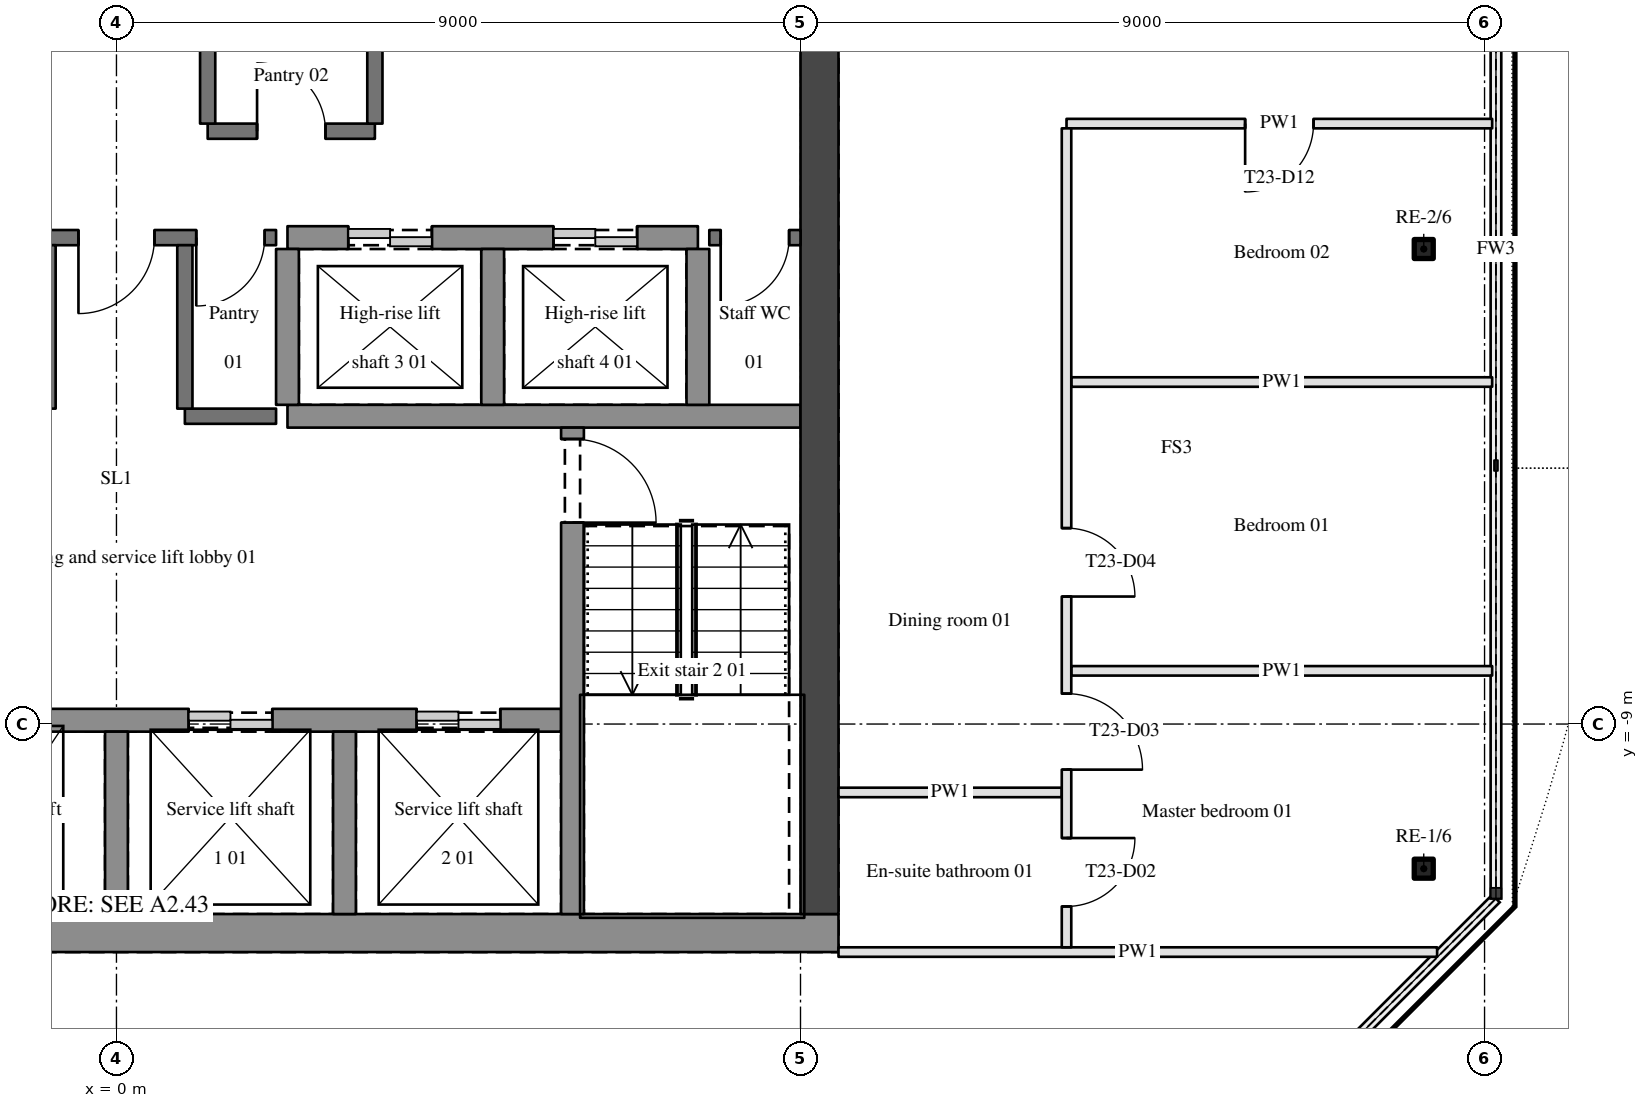
"""IFC4 building model, lengths in metres.
Left out: names, types, materials, properties, quantities, classifications, styles, units other than length and angle.
Written with IfcOpenShell. Run it as: python <this file> out.ifc"""

import sys

from ifc_helpers import new_model, si_unit, direction, frame, frame_2d, origin, origin_2d, place, context, subcontext, project, spatial, rectangle, hollow_rectangle, extrude, element, fill, save


model = new_model("IFC4")
c1 = context("Model", 3, precision=1e-05, world=origin(), true_north=direction((0.0, 1.0)))
c2 = subcontext(c1, "Body", "Model", "MODEL_VIEW")
j1 = project(units=[si_unit("LENGTHUNIT", "METRE"), si_unit("PLANEANGLEUNIT", "RADIAN")], contexts=[c1])
p1 = place(None, origin())
s1 = spatial("IfcSite", under=j1, at=p1, CompositionType="ELEMENT")
p2 = place(p1, origin())
s2 = spatial("IfcBuilding", under=s1, at=p2, CompositionType="ELEMENT")
p3 = place(p2, frame((0.0, 0.0, 294.15)))
s3 = spatial("IfcBuildingStorey", under=s2, at=p3, CompositionType="ELEMENT", Elevation=294.15)
for number, where, z_axis, x_axis in (
    (1, (17.2, -10.903, 0.0), (0.0, 0.0, 1.0), (1.0, 0.0, 0.0)),
    (2, (17.2, -2.75, 0.0), (0.0, 0.0, 1.0), (1.0, 0.0, 0.0)),
):
    element("IfcColumn", number, at=place(p3, frame(where, z_axis=z_axis, x_axis=x_axis)), inside=s3, PredefinedType="COLUMN", context=c2, shape_type="SweptSolid", body=[
        extrude(hollow_rectangle(XDim=0.25, YDim=0.25, WallThickness=0.02, InnerFilletRadius=0.03, OuterFilletRadius=0.05, at=origin_2d()), origin(), (0.0, 0.0, 1.0), 3.15),
    ])
p4 = place(p3, frame((-9.5, -11.75, 0.0), z_axis=(0.0, 0.0, 1.0), x_axis=(1.0, 0.0, 0.0)))
e3 = element("IfcWall", 3, at=p4, inside=s3, PredefinedType="SHEAR", context=c2, shape_type="SweptSolid", body=[
    extrude(rectangle(XDim=19.0, YDim=0.5, at=frame_2d((9.5, 0.0))), origin(), (0.0, 0.0, 1.0), 3.15),
])
p5 = place(p3, frame((9.25, -11.5, 0.0), z_axis=(0.0, 0.0, 1.0), x_axis=(0.0, 1.0, 0.0)))
e4 = element("IfcWall", 4, at=p5, inside=s3, PredefinedType="SHEAR", context=c2, shape_type="SweptSolid", body=[
    extrude(rectangle(XDim=11.65, YDim=0.5, at=frame_2d((5.825, 0.0))), origin(), (0.0, 0.0, 1.0), 3.15),
])
p6 = place(p3, frame((9.5, -12.0, 0.0), z_axis=(0.0, 0.0, 1.0), x_axis=(1.0, 0.0, 0.0)))
e5 = element("IfcWall", 5, at=p6, inside=s3, PredefinedType="PARTITIONING", context=c2, shape_type="SweptSolid", body=[
    extrude(rectangle(XDim=7.876, YDim=0.125, at=frame_2d((3.938, 0.0))), origin(), (0.0, 0.0, 1.0), 2.21),
])
p7 = place(p3, frame((9.5, -9.9, 0.0), z_axis=(0.0, 0.0, 1.0), x_axis=(1.0, 0.0, 0.0)))
e6 = element("IfcWall", 6, at=p7, inside=s3, PredefinedType="PARTITIONING", context=c2, shape_type="SweptSolid", body=[
    extrude(rectangle(XDim=2.938, YDim=0.125, at=frame_2d((1.469, 0.0))), origin(), (0.0, 0.0, 1.0), 2.21),
])
p8 = place(p3, frame((-5.85, -8.95, 0.0), z_axis=(0.0, 0.0, 1.0), x_axis=(1.0, 0.0, 0.0)))
e7 = element("IfcWall", 7, at=p8, inside=s3, PredefinedType="SHEAR", context=c2, shape_type="SweptSolid", body=[
    extrude(rectangle(XDim=11.7, YDim=0.3, at=frame_2d((5.85, 0.0))), origin(), (0.0, 0.0, 1.0), 3.15),
])
p9 = place(p8, frame((0.8, 0.0, 0.0)))
e8 = element("IfcOpeningElement", 8, at=p9, cuts=e7, PredefinedType="OPENING", context=c2, shape_type="SweptSolid", body=[
    extrude(rectangle(XDim=1.1, YDim=2.1, at=frame_2d((0.55, 1.05))), frame((0.0, 0.16, 0.0), z_axis=(0.0, -1.0, 0.0), x_axis=(1.0, 0.0, 0.0)), (0.0, 0.0, 1.0), 0.32),
])
p10 = place(p8, frame((3.8, 0.0, 0.0)))
e9 = element("IfcOpeningElement", 9, at=p10, cuts=e7, PredefinedType="OPENING", context=c2, shape_type="SweptSolid", body=[
    extrude(rectangle(XDim=1.1, YDim=2.1, at=frame_2d((0.55, 1.05))), frame((0.0, 0.16, 0.0), z_axis=(0.0, -1.0, 0.0), x_axis=(1.0, 0.0, 0.0)), (0.0, 0.0, 1.0), 0.32),
])
p11 = place(p8, frame((6.8, 0.0, 0.0)))
e10 = element("IfcOpeningElement", 10, at=p11, cuts=e7, PredefinedType="OPENING", context=c2, shape_type="SweptSolid", body=[
    extrude(rectangle(XDim=1.1, YDim=2.1, at=frame_2d((0.55, 1.05))), frame((0.0, 0.16, 0.0), z_axis=(0.0, -1.0, 0.0), x_axis=(1.0, 0.0, 0.0)), (0.0, 0.0, 1.0), 0.32),
])
p12 = place(p8, frame((9.8, 0.0, 0.0)))
e11 = element("IfcOpeningElement", 11, at=p12, cuts=e7, PredefinedType="OPENING", context=c2, shape_type="SweptSolid", body=[
    extrude(rectangle(XDim=1.1, YDim=2.1, at=frame_2d((0.55, 1.05))), frame((0.0, 0.16, 0.0), z_axis=(0.0, -1.0, 0.0), x_axis=(1.0, 0.0, 0.0)), (0.0, 0.0, 1.0), 0.32),
])
p13 = place(p3, frame((12.562, -8.3, 0.0), z_axis=(0.0, 0.0, 1.0), x_axis=(1.0, 0.0, 0.0)))
e12 = element("IfcWall", 12, at=p13, inside=s3, PredefinedType="PARTITIONING", context=c2, shape_type="SweptSolid", body=[
    extrude(rectangle(XDim=5.538, YDim=0.125, at=frame_2d((2.769, 0.0))), origin(), (0.0, 0.0, 1.0), 2.21),
])
p14 = place(p3, frame((0.9, -4.95, 0.0), z_axis=(0.0, 0.0, 1.0), x_axis=(1.0, 0.0, 0.0)))
e13 = element("IfcWall", 13, at=p14, inside=s3, PredefinedType="SOLIDWALL", context=c2, shape_type="SweptSolid", body=[
    extrude(rectangle(XDim=1.2, YDim=0.2, at=frame_2d((0.6, 0.0))), origin(), (0.0, 0.0, 1.0), 2.85),
])
p15 = place(p3, frame((2.25, -4.95, 0.0), z_axis=(0.0, 0.0, 1.0), x_axis=(1.0, 0.0, 0.0)))
e14 = element("IfcWall", 14, at=p15, inside=s3, PredefinedType="SHEAR", context=c2, shape_type="SweptSolid", body=[
    extrude(rectangle(XDim=6.75, YDim=0.3, at=frame_2d((3.375, 0.0))), origin(), (0.0, 0.0, 1.0), 3.15),
])
p16 = place(p3, frame((12.562, -4.5, 0.0), z_axis=(0.0, 0.0, 1.0), x_axis=(1.0, 0.0, 0.0)))
e15 = element("IfcWall", 15, at=p16, inside=s3, PredefinedType="PARTITIONING", context=c2, shape_type="SweptSolid", body=[
    extrude(rectangle(XDim=5.538, YDim=0.125, at=frame_2d((2.769, 0.0))), origin(), (0.0, 0.0, 1.0), 2.21),
])
p17 = place(p3, frame((2.1, -2.6, 0.0), z_axis=(0.0, 0.0, 1.0), x_axis=(-1.0, 0.0, 0.0)))
e16 = element("IfcWall", 16, at=p17, inside=s3, PredefinedType="SOLIDWALL", context=c2, shape_type="SweptSolid", body=[
    extrude(rectangle(XDim=4.2, YDim=0.2, at=frame_2d((2.1, 0.0))), origin(), (0.0, 0.0, 1.0), 2.85),
])
p18 = place(p17, frame((1.6, 0.0, 0.0)))
e17 = element("IfcOpeningElement", 17, at=p18, cuts=e16, PredefinedType="OPENING", context=c2, shape_type="SweptSolid", body=[
    extrude(rectangle(XDim=1.0, YDim=2.1, at=frame_2d((0.5, 1.05))), frame((0.0, 0.11, 0.0), z_axis=(0.0, -1.0, 0.0), x_axis=(1.0, 0.0, 0.0)), (0.0, 0.0, 1.0), 0.22),
])
p19 = place(p17, frame((3.15, 0.0, 0.0)))
e18 = element("IfcOpeningElement", 18, at=p19, cuts=e16, PredefinedType="OPENING", context=c2, shape_type="SweptSolid", body=[
    extrude(rectangle(XDim=0.9, YDim=2.1, at=frame_2d((0.45, 1.05))), frame((0.0, 0.11, 0.0), z_axis=(0.0, -1.0, 0.0), x_axis=(1.0, 0.0, 0.0)), (0.0, 0.0, 1.0), 0.22),
])
p20 = place(p17, frame((0.15, 0.0, 0.0)))
e19 = element("IfcOpeningElement", 19, at=p20, cuts=e16, PredefinedType="OPENING", context=c2, shape_type="SweptSolid", body=[
    extrude(rectangle(XDim=0.9, YDim=2.1, at=frame_2d((0.45, 1.05))), frame((0.0, 0.11, 0.0), z_axis=(0.0, -1.0, 0.0), x_axis=(1.0, 0.0, 0.0)), (0.0, 0.0, 1.0), 0.22),
])
p21 = place(p3, frame((2.25, -2.6, 0.0), z_axis=(0.0, 0.0, 1.0), x_axis=(1.0, 0.0, 0.0)))
e20 = element("IfcWall", 20, at=p21, inside=s3, PredefinedType="SHEAR", context=c2, shape_type="SweptSolid", body=[
    extrude(rectangle(XDim=5.4, YDim=0.3, at=frame_2d((2.7, 0.0))), origin(), (0.0, 0.0, 1.0), 3.15),
])
p22 = place(p21, frame((0.8, 0.0, 0.0)))
e21 = element("IfcOpeningElement", 21, at=p22, cuts=e20, PredefinedType="OPENING", context=c2, shape_type="SweptSolid", body=[
    extrude(rectangle(XDim=1.1, YDim=2.1, at=frame_2d((0.55, 1.05))), frame((0.0, 0.16, 0.0), z_axis=(0.0, -1.0, 0.0), x_axis=(1.0, 0.0, 0.0)), (0.0, 0.0, 1.0), 0.32),
])
p23 = place(p21, frame((3.5, 0.0, 0.0)))
e22 = element("IfcOpeningElement", 22, at=p23, cuts=e20, PredefinedType="OPENING", context=c2, shape_type="SweptSolid", body=[
    extrude(rectangle(XDim=1.1, YDim=2.1, at=frame_2d((0.55, 1.05))), frame((0.0, 0.16, 0.0), z_axis=(0.0, -1.0, 0.0), x_axis=(1.0, 0.0, 0.0)), (0.0, 0.0, 1.0), 0.32),
])
p24 = place(p3, frame((9.0, -2.6, 0.0), z_axis=(0.0, 0.0, 1.0), x_axis=(-1.0, 0.0, 0.0)))
e23 = element("IfcWall", 23, at=p24, inside=s3, PredefinedType="SOLIDWALL", context=c2, shape_type="SweptSolid", body=[
    extrude(rectangle(XDim=1.2, YDim=0.2, at=frame_2d((0.6, 0.0))), origin(), (0.0, 0.0, 1.0), 2.85),
])
p25 = place(p24, frame((0.15, 0.0, 0.0)))
e24 = element("IfcOpeningElement", 24, at=p25, cuts=e23, PredefinedType="OPENING", context=c2, shape_type="SweptSolid", body=[
    extrude(rectangle(XDim=0.9, YDim=2.1, at=frame_2d((0.45, 1.05))), frame((0.0, 0.11, 0.0), z_axis=(0.0, -1.0, 0.0), x_axis=(1.0, 0.0, 0.0)), (0.0, 0.0, 1.0), 0.22),
])
p26 = place(p3, frame((1.2, -1.2, 0.0), z_axis=(0.0, 0.0, 1.0), x_axis=(1.0, 0.0, 0.0)))
e25 = element("IfcWall", 25, at=p26, inside=s3, PredefinedType="SOLIDWALL", context=c2, shape_type="SweptSolid", body=[
    extrude(rectangle(XDim=2.2, YDim=0.2, at=frame_2d((1.1, 0.0))), origin(), (0.0, 0.0, 1.0), 2.85),
])
p27 = place(p26, frame((0.65, 0.0, 0.0)))
e26 = element("IfcOpeningElement", 26, at=p27, cuts=e25, PredefinedType="OPENING", context=c2, shape_type="SweptSolid", body=[
    extrude(rectangle(XDim=0.9, YDim=2.1, at=frame_2d((0.45, 1.05))), frame((0.0, 0.11, 0.0), z_axis=(0.0, -1.0, 0.0), x_axis=(1.0, 0.0, 0.0)), (0.0, 0.0, 1.0), 0.22),
])
p28 = place(p3, frame((18.1, -1.1, 0.0), z_axis=(0.0, 0.0, 1.0), x_axis=(-1.0, 0.0, 0.0)))
e27 = element("IfcWall", 27, at=p28, inside=s3, PredefinedType="PARTITIONING", context=c2, shape_type="SweptSolid", body=[
    extrude(rectangle(XDim=5.6, YDim=0.125, at=frame_2d((2.8, 0.0))), origin(), (0.0, 0.0, 1.0), 2.21),
])
p29 = place(p28, frame((2.35, 0.0, 0.0)))
e28 = element("IfcOpeningElement", 28, at=p29, cuts=e27, PredefinedType="OPENING", context=c2, shape_type="SweptSolid", body=[
    extrude(rectangle(XDim=0.9, YDim=2.1, at=frame_2d((0.45, 1.05))), frame((0.0, 0.073, 0.0), z_axis=(0.0, -1.0, 0.0), x_axis=(1.0, 0.0, 0.0)), (0.0, 0.0, 1.0), 0.145),
])
p30 = place(p3, frame((-0.9, -4.85, 0.0), z_axis=(0.0, 0.0, 1.0), x_axis=(0.0, 1.0, 0.0)))
e29 = element("IfcWall", 29, at=p30, inside=s3, PredefinedType="SOLIDWALL", context=c2, shape_type="SweptSolid", body=[
    extrude(rectangle(XDim=2.15, YDim=0.2, at=frame_2d((1.075, 0.0))), origin(), (0.0, 0.0, 1.0), 2.85),
])
p31 = place(p3, frame((0.0, -11.5, 0.0), z_axis=(0.0, 0.0, 1.0), x_axis=(0.0, 1.0, 0.0)))
e30 = element("IfcWall", 30, at=p31, inside=s3, PredefinedType="SHEAR", context=c2, shape_type="SweptSolid", body=[
    extrude(rectangle(XDim=2.4, YDim=0.3, at=frame_2d((1.2, 0.0))), origin(), (0.0, 0.0, 1.0), 3.15),
])
p32 = place(p3, frame((0.9, -4.85, 0.0), z_axis=(0.0, 0.0, 1.0), x_axis=(0.0, 1.0, 0.0)))
e31 = element("IfcWall", 31, at=p32, inside=s3, PredefinedType="SOLIDWALL", context=c2, shape_type="SweptSolid", body=[
    extrude(rectangle(XDim=2.15, YDim=0.2, at=frame_2d((1.075, 0.0))), origin(), (0.0, 0.0, 1.0), 2.85),
])
p33 = place(p3, frame((1.2, -1.1, 0.0), z_axis=(0.0, 0.0, 1.0), x_axis=(0.0, 1.0, 0.0)))
e32 = element("IfcWall", 32, at=p33, inside=s3, PredefinedType="SOLIDWALL", context=c2, shape_type="SweptSolid", body=[
    extrude(rectangle(XDim=1.25, YDim=0.2, at=frame_2d((0.625, 0.0))), origin(), (0.0, 0.0, 1.0), 2.85),
])
p34 = place(p3, frame((2.25, -4.8, 0.0), z_axis=(0.0, 0.0, 1.0), x_axis=(0.0, 1.0, 0.0)))
e33 = element("IfcWall", 33, at=p34, inside=s3, PredefinedType="SHEAR", context=c2, shape_type="SweptSolid", body=[
    extrude(rectangle(XDim=2.05, YDim=0.3, at=frame_2d((1.025, 0.0))), origin(), (0.0, 0.0, 1.0), 3.15),
])
p35 = place(p3, frame((3.0, -11.5, 0.0), z_axis=(0.0, 0.0, 1.0), x_axis=(0.0, 1.0, 0.0)))
e34 = element("IfcWall", 34, at=p35, inside=s3, PredefinedType="SHEAR", context=c2, shape_type="SweptSolid", body=[
    extrude(rectangle(XDim=2.4, YDim=0.3, at=frame_2d((1.2, 0.0))), origin(), (0.0, 0.0, 1.0), 3.15),
])
p36 = place(p3, frame((3.4, -1.1, 0.0), z_axis=(0.0, 0.0, 1.0), x_axis=(0.0, 1.0, 0.0)))
e35 = element("IfcWall", 35, at=p36, inside=s3, PredefinedType="SOLIDWALL", context=c2, shape_type="SweptSolid", body=[
    extrude(rectangle(XDim=1.25, YDim=0.2, at=frame_2d((0.625, 0.0))), origin(), (0.0, 0.0, 1.0), 2.85),
])
p37 = place(p3, frame((4.95, -4.8, 0.0), z_axis=(0.0, 0.0, 1.0), x_axis=(0.0, 1.0, 0.0)))
e36 = element("IfcWall", 36, at=p37, inside=s3, PredefinedType="SHEAR", context=c2, shape_type="SweptSolid", body=[
    extrude(rectangle(XDim=2.05, YDim=0.3, at=frame_2d((1.025, 0.0))), origin(), (0.0, 0.0, 1.0), 3.15),
])
p38 = place(p3, frame((6.0, -5.1, 0.0), z_axis=(0.0, 0.0, 1.0), x_axis=(0.0, -1.0, 0.0)))
e37 = element("IfcWall", 37, at=p38, inside=s3, PredefinedType="SHEAR", context=c2, shape_type="SweptSolid", body=[
    extrude(rectangle(XDim=6.4, YDim=0.3, at=frame_2d((3.2, 0.0))), origin(), (0.0, 0.0, 1.0), 3.15),
])
p39 = place(p38, frame((0.15, 0.0, 0.0)))
e38 = element("IfcOpeningElement", 38, at=p39, cuts=e37, PredefinedType="OPENING", context=c2, shape_type="SweptSolid", body=[
    extrude(rectangle(XDim=1.1, YDim=2.1, at=frame_2d((0.55, 1.05))), frame((0.0, 0.16, 0.0), z_axis=(0.0, -1.0, 0.0), x_axis=(1.0, 0.0, 0.0)), (0.0, 0.0, 1.0), 0.32),
])
p40 = place(p3, frame((7.65, -4.8, 0.0), z_axis=(0.0, 0.0, 1.0), x_axis=(0.0, 1.0, 0.0)))
e39 = element("IfcWall", 39, at=p40, inside=s3, PredefinedType="SHEAR", context=c2, shape_type="SweptSolid", body=[
    extrude(rectangle(XDim=2.05, YDim=0.3, at=frame_2d((1.025, 0.0))), origin(), (0.0, 0.0, 1.0), 3.15),
])
p41 = place(p3, frame((12.5, -1.163, 0.0), z_axis=(0.0, 0.0, 1.0), x_axis=(0.0, -1.0, 0.0)))
e40 = element("IfcWall", 40, at=p41, inside=s3, PredefinedType="PARTITIONING", context=c2, shape_type="SweptSolid", body=[
    extrude(rectangle(XDim=10.775, YDim=0.125, at=frame_2d((5.387, 0.0))), origin(), (0.0, 0.0, 1.0), 2.21),
])
p42 = place(p41, frame((5.26, 0.0, 0.0)))
e41 = element("IfcOpeningElement", 41, at=p42, cuts=e40, PredefinedType="OPENING", context=c2, shape_type="SweptSolid", body=[
    extrude(rectangle(XDim=0.9, YDim=2.1, at=frame_2d((0.45, 1.05))), frame((0.0, 0.073, 0.0), z_axis=(0.0, -1.0, 0.0), x_axis=(1.0, 0.0, 0.0)), (0.0, 0.0, 1.0), 0.145),
])
p43 = place(p41, frame((7.438, 0.0, 0.0)))
e42 = element("IfcOpeningElement", 42, at=p43, cuts=e40, PredefinedType="OPENING", context=c2, shape_type="SweptSolid", body=[
    extrude(rectangle(XDim=1.0, YDim=2.1, at=frame_2d((0.5, 1.05))), frame((0.0, 0.073, 0.0), z_axis=(0.0, -1.0, 0.0), x_axis=(1.0, 0.0, 0.0)), (0.0, 0.0, 1.0), 0.145),
])
p44 = place(p41, frame((9.337, 0.0, 0.0)))
e43 = element("IfcOpeningElement", 43, at=p44, cuts=e40, PredefinedType="OPENING", context=c2, shape_type="SweptSolid", body=[
    extrude(rectangle(XDim=0.9, YDim=2.1, at=frame_2d((0.45, 1.05))), frame((0.0, 0.073, 0.0), z_axis=(0.0, -1.0, 0.0), x_axis=(1.0, 0.0, 0.0)), (0.0, 0.0, 1.0), 0.145),
])
p45 = place(p18, origin())
e44 = element("IfcDoor", 44, at=p45, inside=s3, OperationType="SINGLE_SWING_RIGHT", PredefinedType="DOOR", context=c2, shape_type="SweptSolid", body=[
    extrude(rectangle(XDim=1.0, YDim=2.1, at=frame_2d((0.5, 1.05))), frame((0.0, 0.025, 0.0), z_axis=(0.0, -1.0, 0.0), x_axis=(1.0, 0.0, 0.0)), (0.0, 0.0, 1.0), 0.05),
])
fill(e17, e44)
p46 = place(p39, origin())
e45 = element("IfcDoor", 45, at=p46, inside=s3, OperationType="SINGLE_SWING_RIGHT", PredefinedType="DOOR", context=c2, shape_type="SweptSolid", body=[
    extrude(rectangle(XDim=1.1, YDim=2.1, at=frame_2d((0.55, 1.05))), frame((0.0, 0.025, 0.0), z_axis=(0.0, -1.0, 0.0), x_axis=(1.0, 0.0, 0.0)), (0.0, 0.0, 1.0), 0.05),
])
fill(e38, e45)
p47 = place(p20, origin())
e46 = element("IfcDoor", 46, at=p47, inside=s3, OperationType="SINGLE_SWING_RIGHT", PredefinedType="DOOR", context=c2, shape_type="SweptSolid", body=[
    extrude(rectangle(XDim=0.9, YDim=2.1, at=frame_2d((0.45, 1.05))), frame((0.0, 0.025, 0.0), z_axis=(0.0, -1.0, 0.0), x_axis=(1.0, 0.0, 0.0)), (0.0, 0.0, 1.0), 0.05),
])
fill(e19, e46)
p48 = place(p25, origin())
e47 = element("IfcDoor", 47, at=p48, inside=s3, OperationType="SINGLE_SWING_RIGHT", PredefinedType="DOOR", context=c2, shape_type="SweptSolid", body=[
    extrude(rectangle(XDim=0.9, YDim=2.1, at=frame_2d((0.45, 1.05))), frame((0.0, 0.025, 0.0), z_axis=(0.0, -1.0, 0.0), x_axis=(1.0, 0.0, 0.0)), (0.0, 0.0, 1.0), 0.05),
])
fill(e24, e47)
p49 = place(p42, origin())
e48 = element("IfcDoor", 48, at=p49, inside=s3, OperationType="SINGLE_SWING_RIGHT", PredefinedType="DOOR", context=c2, shape_type="SweptSolid", body=[
    extrude(rectangle(XDim=0.9, YDim=2.1, at=frame_2d((0.45, 1.05))), frame((0.0, 0.025, 0.0), z_axis=(0.0, -1.0, 0.0), x_axis=(1.0, 0.0, 0.0)), (0.0, 0.0, 1.0), 0.05),
])
fill(e41, e48)
p50 = place(p43, origin())
e49 = element("IfcDoor", 49, at=p50, inside=s3, OperationType="SINGLE_SWING_RIGHT", PredefinedType="DOOR", context=c2, shape_type="SweptSolid", body=[
    extrude(rectangle(XDim=1.0, YDim=2.1, at=frame_2d((0.5, 1.05))), frame((0.0, 0.025, 0.0), z_axis=(0.0, -1.0, 0.0), x_axis=(1.0, 0.0, 0.0)), (0.0, 0.0, 1.0), 0.05),
])
fill(e42, e49)
p51 = place(p29, origin())
e50 = element("IfcDoor", 50, at=p51, inside=s3, OperationType="SINGLE_SWING_RIGHT", PredefinedType="DOOR", context=c2, shape_type="SweptSolid", body=[
    extrude(rectangle(XDim=0.9, YDim=2.1, at=frame_2d((0.45, 1.05))), frame((0.0, 0.025, 0.0), z_axis=(0.0, -1.0, 0.0), x_axis=(1.0, 0.0, 0.0)), (0.0, 0.0, 1.0), 0.05),
])
fill(e28, e50)
p52 = place(p44, origin())
e51 = element("IfcDoor", 51, at=p52, inside=s3, OperationType="SINGLE_SWING_LEFT", PredefinedType="DOOR", context=c2, shape_type="SweptSolid", body=[
    extrude(rectangle(XDim=0.9, YDim=2.1, at=frame_2d((0.45, 1.05))), frame((0.0, 0.025, 0.0), z_axis=(0.0, -1.0, 0.0), x_axis=(1.0, 0.0, 0.0)), (0.0, 0.0, 1.0), 0.05),
])
fill(e43, e51)
p53 = place(p27, origin())
e52 = element("IfcDoor", 52, at=p53, inside=s3, OperationType="SINGLE_SWING_LEFT", PredefinedType="DOOR", context=c2, shape_type="SweptSolid", body=[
    extrude(rectangle(XDim=0.9, YDim=2.1, at=frame_2d((0.45, 1.05))), frame((0.0, 0.025, 0.0), z_axis=(0.0, -1.0, 0.0), x_axis=(1.0, 0.0, 0.0)), (0.0, 0.0, 1.0), 0.05),
])
fill(e26, e52)
p54 = place(p22, origin())
e53 = element("IfcDoor", 53, at=p54, inside=s3, OperationType="DOUBLE_DOOR_SLIDING", PredefinedType="DOOR", context=c2, shape_type="SweptSolid", body=[
    extrude(rectangle(XDim=1.1, YDim=2.1, at=frame_2d((0.55, 1.05))), frame((0.0, 0.025, 0.0), z_axis=(0.0, -1.0, 0.0), x_axis=(1.0, 0.0, 0.0)), (0.0, 0.0, 1.0), 0.05),
])
fill(e21, e53)
p55 = place(p23, origin())
e54 = element("IfcDoor", 54, at=p55, inside=s3, OperationType="DOUBLE_DOOR_SLIDING", PredefinedType="DOOR", context=c2, shape_type="SweptSolid", body=[
    extrude(rectangle(XDim=1.1, YDim=2.1, at=frame_2d((0.55, 1.05))), frame((0.0, 0.025, 0.0), z_axis=(0.0, -1.0, 0.0), x_axis=(1.0, 0.0, 0.0)), (0.0, 0.0, 1.0), 0.05),
])
fill(e22, e54)
p56 = place(p11, origin())
e55 = element("IfcDoor", 55, at=p56, inside=s3, OperationType="DOUBLE_DOOR_SLIDING", PredefinedType="DOOR", context=c2, shape_type="SweptSolid", body=[
    extrude(rectangle(XDim=1.1, YDim=2.1, at=frame_2d((0.55, 1.05))), frame((0.0, 0.025, 0.0), z_axis=(0.0, -1.0, 0.0), x_axis=(1.0, 0.0, 0.0)), (0.0, 0.0, 1.0), 0.05),
])
fill(e10, e55)
p57 = place(p12, origin())
e56 = element("IfcDoor", 56, at=p57, inside=s3, OperationType="DOUBLE_DOOR_SLIDING", PredefinedType="DOOR", context=c2, shape_type="SweptSolid", body=[
    extrude(rectangle(XDim=1.1, YDim=2.1, at=frame_2d((0.55, 1.05))), frame((0.0, 0.025, 0.0), z_axis=(0.0, -1.0, 0.0), x_axis=(1.0, 0.0, 0.0)), (0.0, 0.0, 1.0), 0.05),
])
fill(e11, e56)
save(model, sys.argv[1])
